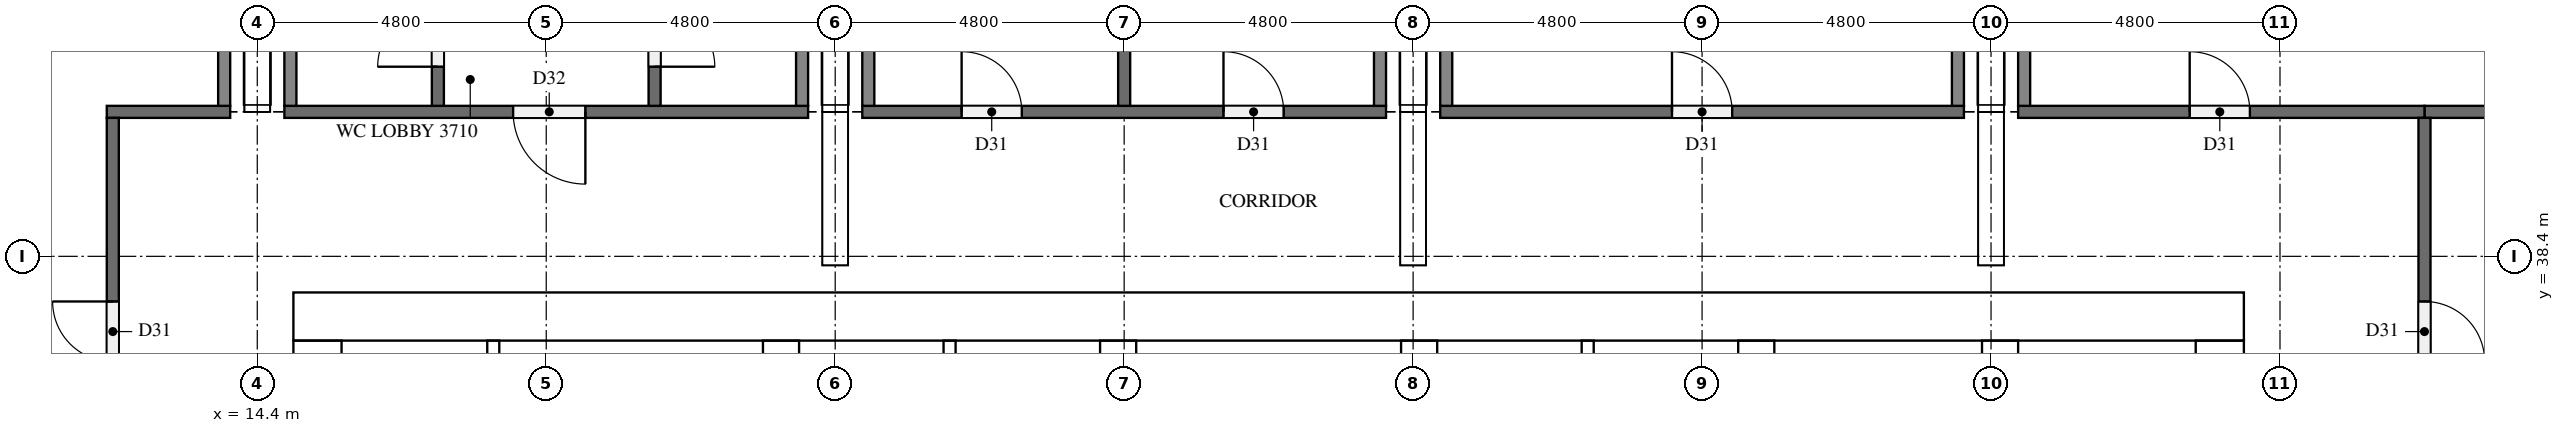
"""IFC4 building model, lengths in metres.
Left out: names, types, materials, properties, quantities, classifications, styles, units other than length and angle.
Written with IfcOpenShell. Run it as: python <this file> out.ifc"""

import sys

from ifc_helpers import new_model, si_unit, direction, frame, frame_2d, origin, place, context, subcontext, project, spatial, rectangle, extrude, element, fill, save


model = new_model("IFC4")
c1 = context("Model", 3, precision=1e-05, world=origin(), true_north=direction((0.0, 1.0)))
c2 = subcontext(c1, "Body", "Model", "MODEL_VIEW")
j1 = project(units=[si_unit("LENGTHUNIT", "METRE"), si_unit("PLANEANGLEUNIT", "RADIAN")], contexts=[c1])
p1 = place(None, origin())
s1 = spatial("IfcSite", under=j1, at=p1, CompositionType="ELEMENT")
p2 = place(p1, origin())
s2 = spatial("IfcBuilding", under=s1, at=p2, CompositionType="ELEMENT")
p3 = place(p2, frame((0.0, 0.0, 143.6)))
s3 = spatial("IfcBuildingStorey", under=s2, at=p3, CompositionType="ELEMENT", Elevation=143.6)
p4 = place(p3, frame((15.0, 37.4, 0.0), z_axis=(0.0, 0.0, 1.0), x_axis=(1.0, 0.0, 0.0)))
e1 = element("IfcWall", 1, at=p4, inside=s3, PredefinedType="SHEAR", context=c2, shape_type="SweptSolid", body=[
    extrude(rectangle(XDim=32.4, YDim=0.8, at=frame_2d((16.2, 0.0))), origin(), (0.0, 0.0, 1.0), 5.1),
])
p5 = place(p4, frame((15.3, 0.0, 0.0)))
e2 = element("IfcOpeningElement", 2, at=p5, cuts=e1, PredefinedType="OPENING", context=c2, shape_type="SweptSolid", body=[
    extrude(rectangle(XDim=1.8, YDim=2.1, at=frame_2d((0.9, 1.05))), frame((0.0, 0.41, 0.0), z_axis=(0.0, -1.0, 0.0), x_axis=(1.0, 0.0, 0.0)), (0.0, 0.0, 1.0), 0.82),
])
p6 = place(p4, frame((1.51, 0.0, 0.0)))
e3 = element("IfcOpeningElement", 3, at=p6, cuts=e1, PredefinedType="OPENING", context=c2, shape_type="SweptSolid", body=[
    extrude(rectangle(XDim=1.0, YDim=2.1, at=frame_2d((0.5, 1.05))), frame((0.0, 0.41, 0.0), z_axis=(0.0, -1.0, 0.0), x_axis=(1.0, 0.0, 0.0)), (0.0, 0.0, 1.0), 0.82),
])
p7 = place(p4, frame((5.11, 0.0, 0.0)))
e4 = element("IfcOpeningElement", 4, at=p7, cuts=e1, PredefinedType="OPENING", context=c2, shape_type="SweptSolid", body=[
    extrude(rectangle(XDim=1.0, YDim=2.1, at=frame_2d((0.5, 1.05))), frame((0.0, 0.41, 0.0), z_axis=(0.0, -1.0, 0.0), x_axis=(1.0, 0.0, 0.0)), (0.0, 0.0, 1.0), 0.82),
])
p8 = place(p3, frame((15.4, 15.8, 0.0), z_axis=(0.0, 0.0, 1.0), x_axis=(0.0, 1.0, 0.0)))
e5 = element("IfcWall", 5, at=p8, inside=s3, PredefinedType="SHEAR", context=c2, shape_type="SweptSolid", body=[
    extrude(rectangle(XDim=21.2, YDim=0.8, at=frame_2d((10.6, 0.0))), origin(), (0.0, 0.0, 1.0), 5.1),
])
p9 = place(p8, frame((4.96, 0.0, 0.0)))
e6 = element("IfcOpeningElement", 6, at=p9, cuts=e5, PredefinedType="OPENING", context=c2, shape_type="SweptSolid", body=[
    extrude(rectangle(XDim=1.2, YDim=2.1, at=frame_2d((0.6, 1.05))), frame((0.0, 0.41, 0.0), z_axis=(0.0, -1.0, 0.0), x_axis=(1.0, 0.0, 0.0)), (0.0, 0.0, 1.0), 0.82),
])
p10 = place(p3, frame((47.0, 15.8, 0.0), z_axis=(0.0, 0.0, 1.0), x_axis=(0.0, 1.0, 0.0)))
e7 = element("IfcWall", 7, at=p10, inside=s3, PredefinedType="SHEAR", context=c2, shape_type="SweptSolid", body=[
    extrude(rectangle(XDim=21.2, YDim=0.8, at=frame_2d((10.6, 0.0))), origin(), (0.0, 0.0, 1.0), 5.1),
])
p11 = place(p10, frame((10.3, 0.0, 0.0)))
e8 = element("IfcOpeningElement", 8, at=p11, cuts=e7, PredefinedType="OPENING", context=c2, shape_type="SweptSolid", body=[
    extrude(rectangle(XDim=1.2, YDim=2.1, at=frame_2d((0.6, 1.05))), frame((0.0, 0.41, 0.0), z_axis=(0.0, -1.0, 0.0), x_axis=(1.0, 0.0, 0.0)), (0.0, 0.0, 1.0), 0.82),
])
p12 = place(p3, frame((23.1, 15.8, 0.0), z_axis=(0.0, 0.0, 1.0), x_axis=(0.0, 1.0, 0.0)))
e9 = element("IfcWall", 9, at=p12, inside=s3, PredefinedType="SHEAR", context=c2, shape_type="SweptSolid", body=[
    extrude(rectangle(XDim=21.2, YDim=0.6, at=frame_2d((10.6, 0.0))), origin(), (0.0, 0.0, 1.0), 5.1),
])
p13 = place(p3, frame((39.3, 27.75, 0.0), z_axis=(0.0, 0.0, 1.0), x_axis=(0.0, 1.0, 0.0)))
e10 = element("IfcWall", 10, at=p13, inside=s3, PredefinedType="SHEAR", context=c2, shape_type="SweptSolid", body=[
    extrude(rectangle(XDim=9.25, YDim=0.6, at=frame_2d((4.625, 0.0))), origin(), (0.0, 0.0, 1.0), 5.1),
])
p14 = place(p3, frame((43.35, 27.75, 0.0), z_axis=(0.0, 0.0, 1.0), x_axis=(0.0, 1.0, 0.0)))
e11 = element("IfcWall", 11, at=p14, inside=s3, PredefinedType="SHEAR", context=c2, shape_type="SweptSolid", body=[
    extrude(rectangle(XDim=9.25, YDim=0.6, at=frame_2d((4.625, 0.0))), origin(), (0.0, 0.0, 1.0), 5.1),
])
p15 = place(p14, frame((7.65, 0.0, 0.0)))
e12 = element("IfcOpeningElement", 12, at=p15, cuts=e11, PredefinedType="OPENING", context=c2, shape_type="SweptSolid", body=[
    extrude(rectangle(XDim=1.2, YDim=2.1, at=frame_2d((0.6, 1.05))), frame((0.0, 0.31, 0.0), z_axis=(0.0, -1.0, 0.0), x_axis=(1.0, 0.0, 0.0)), (0.0, 0.0, 1.0), 0.62),
])
for number, where, z_axis, x_axis in (
    (13, (28.7, 33.85, 0.0), (0.0, 0.0, 1.0), (0.0, 1.0, 0.0)),
    (14, (33.7, 33.85, 0.0), (0.0, 0.0, 1.0), (0.0, 1.0, 0.0)),
):
    element("IfcWall", number, at=place(p3, frame(where, z_axis=z_axis, x_axis=x_axis)), inside=s3, PredefinedType="SHEAR", context=c2, shape_type="SweptSolid", body=[
        extrude(rectangle(XDim=3.15, YDim=0.6, at=frame_2d((1.575, 0.0))), origin(), (0.0, 0.0, 1.0), 5.1),
    ])
for number, where, z_axis, x_axis in (
    (15, (25.9, 33.85, 0.0), (0.0, 0.0, 1.0), (0.0, 1.0, 0.0)),
    (16, (36.5, 33.85, 0.0), (0.0, 0.0, 1.0), (0.0, 1.0, 0.0)),
):
    element("IfcWall", number, at=place(p3, frame(where, z_axis=z_axis, x_axis=x_axis)), inside=s3, PredefinedType="SOLIDWALL", context=c2, shape_type="SweptSolid", body=[
        extrude(rectangle(XDim=3.15, YDim=0.2, at=frame_2d((1.575, 0.0))), origin(), (0.0, 0.0, 1.0), 5.1),
    ])
p16 = place(p3, frame((18.32, 31.55, 0.0), z_axis=(0.0, 0.0, 1.0), x_axis=(0.0, 1.0, 0.0)))
e17 = element("IfcWall", 17, at=p16, inside=s3, PredefinedType="PARTITIONING", context=c2, shape_type="SweptSolid", body=[
    extrude(rectangle(XDim=5.45, YDim=0.2, at=frame_2d((2.725, 0.0))), origin(), (0.0, 0.0, 1.0), 5.1),
])
p17 = place(p3, frame((50.4, 40.8, 0.0), z_axis=(0.0, 0.0, 1.0), x_axis=(1.0, 0.0, 0.0)))
e18 = element("IfcWall", 18, at=p17, inside=s3, PredefinedType="PARTITIONING", context=c2, shape_type="SweptSolid", body=[
    extrude(rectangle(XDim=1.75, YDim=0.2, at=frame_2d((0.875, 0.0))), origin(), (0.0, 0.0, 1.0), 5.1),
])
p18 = place(p3, frame((11.9, 40.8, 0.0), z_axis=(0.0, 0.0, 1.0), x_axis=(1.0, 0.0, 0.0)))
e19 = element("IfcWall", 19, at=p18, inside=s3, PredefinedType="PARTITIONING", context=c2, shape_type="SweptSolid", body=[
    extrude(rectangle(XDim=2.05, YDim=0.2, at=frame_2d((1.025, 0.0))), origin(), (0.0, 0.0, 1.0), 5.1),
])
p19 = place(p3, frame((23.55, 40.8, 0.0), z_axis=(0.0, 0.0, 1.0), x_axis=(-1.0, 0.0, 0.0)))
e20 = element("IfcWall", 20, at=p19, inside=s3, PredefinedType="PARTITIONING", context=c2, shape_type="SweptSolid", body=[
    extrude(rectangle(XDim=8.7, YDim=0.2, at=frame_2d((4.35, 0.0))), origin(), (0.0, 0.0, 1.0), 5.1),
])
p20 = place(p19, frame((3.7, 0.0, 0.0)))
e21 = element("IfcOpeningElement", 21, at=p20, cuts=e20, PredefinedType="OPENING", context=c2, shape_type="SweptSolid", body=[
    extrude(rectangle(XDim=1.2, YDim=2.1, at=frame_2d((0.6, 1.05))), frame((0.0, 0.11, 0.0), z_axis=(0.0, -1.0, 0.0), x_axis=(1.0, 0.0, 0.0)), (0.0, 0.0, 1.0), 0.22),
])
p21 = place(p3, frame((24.45, 40.8, 0.0), z_axis=(0.0, 0.0, 1.0), x_axis=(1.0, 0.0, 0.0)))
e22 = element("IfcWall", 22, at=p21, inside=s3, PredefinedType="PARTITIONING", context=c2, shape_type="SweptSolid", body=[
    extrude(rectangle(XDim=8.7, YDim=0.2, at=frame_2d((4.35, 0.0))), origin(), (0.0, 0.0, 1.0), 5.1),
])
p22 = place(p21, frame((1.65, 0.0, 0.0)))
e23 = element("IfcOpeningElement", 23, at=p22, cuts=e22, PredefinedType="OPENING", context=c2, shape_type="SweptSolid", body=[
    extrude(rectangle(XDim=1.0, YDim=2.1, at=frame_2d((0.5, 1.05))), frame((0.0, 0.11, 0.0), z_axis=(0.0, -1.0, 0.0), x_axis=(1.0, 0.0, 0.0)), (0.0, 0.0, 1.0), 0.22),
])
p23 = place(p21, frame((6.0, 0.0, 0.0)))
e24 = element("IfcOpeningElement", 24, at=p23, cuts=e22, PredefinedType="OPENING", context=c2, shape_type="SweptSolid", body=[
    extrude(rectangle(XDim=1.0, YDim=2.1, at=frame_2d((0.5, 1.05))), frame((0.0, 0.11, 0.0), z_axis=(0.0, -1.0, 0.0), x_axis=(1.0, 0.0, 0.0)), (0.0, 0.0, 1.0), 0.22),
])
p24 = place(p3, frame((34.05, 40.8, 0.0), z_axis=(0.0, 0.0, 1.0), x_axis=(1.0, 0.0, 0.0)))
e25 = element("IfcWall", 25, at=p24, inside=s3, PredefinedType="PARTITIONING", context=c2, shape_type="SweptSolid", body=[
    extrude(rectangle(XDim=8.7, YDim=0.2, at=frame_2d((4.35, 0.0))), origin(), (0.0, 0.0, 1.0), 5.1),
])
p25 = place(p24, frame((3.85, 0.0, 0.0)))
e26 = element("IfcOpeningElement", 26, at=p25, cuts=e25, PredefinedType="OPENING", context=c2, shape_type="SweptSolid", body=[
    extrude(rectangle(XDim=1.0, YDim=2.1, at=frame_2d((0.5, 1.05))), frame((0.0, 0.11, 0.0), z_axis=(0.0, -1.0, 0.0), x_axis=(1.0, 0.0, 0.0)), (0.0, 0.0, 1.0), 0.22),
])
p26 = place(p3, frame((43.65, 40.8, 0.0), z_axis=(0.0, 0.0, 1.0), x_axis=(1.0, 0.0, 0.0)))
e27 = element("IfcWall", 27, at=p26, inside=s3, PredefinedType="PARTITIONING", context=c2, shape_type="SweptSolid", body=[
    extrude(rectangle(XDim=6.75, YDim=0.2, at=frame_2d((3.375, 0.0))), origin(), (0.0, 0.0, 1.0), 5.1),
])
p27 = place(p26, frame((2.85, 0.0, 0.0)))
e28 = element("IfcOpeningElement", 28, at=p27, cuts=e27, PredefinedType="OPENING", context=c2, shape_type="SweptSolid", body=[
    extrude(rectangle(XDim=1.0, YDim=2.1, at=frame_2d((0.5, 1.05))), frame((0.0, 0.11, 0.0), z_axis=(0.0, -1.0, 0.0), x_axis=(1.0, 0.0, 0.0)), (0.0, 0.0, 1.0), 0.22),
])
p28 = place(p3, frame((12.0, 12.1, 0.0), z_axis=(0.0, 0.0, 1.0), x_axis=(0.0, 1.0, 0.0)))
e29 = element("IfcWall", 29, at=p28, inside=s3, PredefinedType="PARTITIONING", context=c2, shape_type="SweptSolid", body=[
    extrude(rectangle(XDim=28.6, YDim=0.2, at=frame_2d((14.3, 0.0))), origin(), (0.0, 0.0, 1.0), 5.1),
])
p29 = place(p28, frame((5.45, 0.0, 0.0)))
e30 = element("IfcOpeningElement", 30, at=p29, cuts=e29, PredefinedType="OPENING", context=c2, shape_type="SweptSolid", body=[
    extrude(rectangle(XDim=1.0, YDim=2.1, at=frame_2d((0.5, 1.05))), frame((0.0, 0.11, 0.0), z_axis=(0.0, -1.0, 0.0), x_axis=(1.0, 0.0, 0.0)), (0.0, 0.0, 1.0), 0.22),
])
p30 = place(p28, frame((13.85, 0.0, 0.0)))
e31 = element("IfcOpeningElement", 31, at=p30, cuts=e29, PredefinedType="OPENING", context=c2, shape_type="SweptSolid", body=[
    extrude(rectangle(XDim=1.0, YDim=2.1, at=frame_2d((0.5, 1.05))), frame((0.0, 0.11, 0.0), z_axis=(0.0, -1.0, 0.0), x_axis=(1.0, 0.0, 0.0)), (0.0, 0.0, 1.0), 0.22),
])
p31 = place(p28, frame((18.65, 0.0, 0.0)))
e32 = element("IfcOpeningElement", 32, at=p31, cuts=e29, PredefinedType="OPENING", context=c2, shape_type="SweptSolid", body=[
    extrude(rectangle(XDim=1.0, YDim=2.1, at=frame_2d((0.5, 1.05))), frame((0.0, 0.11, 0.0), z_axis=(0.0, -1.0, 0.0), x_axis=(1.0, 0.0, 0.0)), (0.0, 0.0, 1.0), 0.22),
])
p32 = place(p28, frame((24.55, 0.0, 0.0)))
e33 = element("IfcOpeningElement", 33, at=p32, cuts=e29, PredefinedType="OPENING", context=c2, shape_type="SweptSolid", body=[
    extrude(rectangle(XDim=1.0, YDim=2.1, at=frame_2d((0.5, 1.05))), frame((0.0, 0.11, 0.0), z_axis=(0.0, -1.0, 0.0), x_axis=(1.0, 0.0, 0.0)), (0.0, 0.0, 1.0), 0.22),
])
for number, where, z_axis, x_axis in (
    (34, (13.85, 40.9, 0.0), (0.0, 0.0, 1.0), (0.0, 1.0, 0.0)),
    (35, (14.95, 40.9, 0.0), (0.0, 0.0, 1.0), (0.0, 1.0, 0.0)),
):
    element("IfcWall", number, at=place(p3, frame(where, z_axis=z_axis, x_axis=x_axis)), inside=s3, PredefinedType="PARTITIONING", context=c2, shape_type="SweptSolid", body=[
        extrude(rectangle(XDim=4.8, YDim=0.2, at=frame_2d((2.4, 0.0))), origin(), (0.0, 0.0, 1.0), 5.1),
    ])
p33 = place(p3, frame((17.4, 40.9, 0.0), z_axis=(0.0, 0.0, 1.0), x_axis=(0.0, 1.0, 0.0)))
e36 = element("IfcWall", 36, at=p33, inside=s3, PredefinedType="PARTITIONING", context=c2, shape_type="SweptSolid", body=[
    extrude(rectangle(XDim=4.8, YDim=0.2, at=frame_2d((2.4, 0.0))), origin(), (0.0, 0.0, 1.0), 5.1),
])
p34 = place(p33, frame((0.65, 0.0, 0.0)))
e37 = element("IfcOpeningElement", 37, at=p34, cuts=e36, PredefinedType="OPENING", context=c2, shape_type="SweptSolid", body=[
    extrude(rectangle(XDim=1.0, YDim=2.1, at=frame_2d((0.5, 1.05))), frame((0.0, 0.11, 0.0), z_axis=(0.0, -1.0, 0.0), x_axis=(1.0, 0.0, 0.0)), (0.0, 0.0, 1.0), 0.22),
])
p35 = place(p3, frame((21.0, 45.7, 0.0), z_axis=(0.0, 0.0, 1.0), x_axis=(0.0, -1.0, 0.0)))
e38 = element("IfcWall", 38, at=p35, inside=s3, PredefinedType="PARTITIONING", context=c2, shape_type="SweptSolid", body=[
    extrude(rectangle(XDim=4.8, YDim=0.2, at=frame_2d((2.4, 0.0))), origin(), (0.0, 0.0, 1.0), 5.1),
])
p36 = place(p35, frame((3.15, 0.0, 0.0)))
e39 = element("IfcOpeningElement", 39, at=p36, cuts=e38, PredefinedType="OPENING", context=c2, shape_type="SweptSolid", body=[
    extrude(rectangle(XDim=1.0, YDim=2.1, at=frame_2d((0.5, 1.05))), frame((0.0, 0.11, 0.0), z_axis=(0.0, -1.0, 0.0), x_axis=(1.0, 0.0, 0.0)), (0.0, 0.0, 1.0), 0.22),
])
for number, where, z_axis, x_axis in (
    (40, (23.45, 40.9, 0.0), (0.0, 0.0, 1.0), (0.0, 1.0, 0.0)),
    (41, (24.55, 40.9, 0.0), (0.0, 0.0, 1.0), (0.0, 1.0, 0.0)),
    (42, (28.8, 40.9, 0.0), (0.0, 0.0, 1.0), (0.0, 1.0, 0.0)),
    (43, (33.05, 40.9, 0.0), (0.0, 0.0, 1.0), (0.0, 1.0, 0.0)),
    (44, (34.15, 40.9, 0.0), (0.0, 0.0, 1.0), (0.0, 1.0, 0.0)),
    (45, (42.65, 40.9, 0.0), (0.0, 0.0, 1.0), (0.0, 1.0, 0.0)),
    (46, (43.75, 40.9, 0.0), (0.0, 0.0, 1.0), (0.0, 1.0, 0.0)),
):
    element("IfcWall", number, at=place(p3, frame(where, z_axis=z_axis, x_axis=x_axis)), inside=s3, PredefinedType="PARTITIONING", context=c2, shape_type="SweptSolid", body=[
        extrude(rectangle(XDim=4.8, YDim=0.2, at=frame_2d((2.4, 0.0))), origin(), (0.0, 0.0, 1.0), 5.1),
    ])
p37 = place(p3, frame((50.4, 40.7, 0.0), z_axis=(0.0, 0.0, 1.0), x_axis=(0.0, -1.0, 0.0)))
e47 = element("IfcWall", 47, at=p37, inside=s3, PredefinedType="PARTITIONING", context=c2, shape_type="SweptSolid", body=[
    extrude(rectangle(XDim=28.6, YDim=0.2, at=frame_2d((14.3, 0.0))), origin(), (0.0, 0.0, 1.0), 5.1),
])
p38 = place(p37, frame((24.55, 0.0, 0.0)))
e48 = element("IfcOpeningElement", 48, at=p38, cuts=e47, PredefinedType="OPENING", context=c2, shape_type="SweptSolid", body=[
    extrude(rectangle(XDim=1.0, YDim=2.1, at=frame_2d((0.5, 1.05))), frame((0.0, 0.11, 0.0), z_axis=(0.0, -1.0, 0.0), x_axis=(1.0, 0.0, 0.0)), (0.0, 0.0, 1.0), 0.22),
])
p39 = place(p37, frame((18.65, 0.0, 0.0)))
e49 = element("IfcOpeningElement", 49, at=p39, cuts=e47, PredefinedType="OPENING", context=c2, shape_type="SweptSolid", body=[
    extrude(rectangle(XDim=1.0, YDim=2.1, at=frame_2d((0.5, 1.05))), frame((0.0, 0.11, 0.0), z_axis=(0.0, -1.0, 0.0), x_axis=(1.0, 0.0, 0.0)), (0.0, 0.0, 1.0), 0.22),
])
p40 = place(p37, frame((13.85, 0.0, 0.0)))
e50 = element("IfcOpeningElement", 50, at=p40, cuts=e47, PredefinedType="OPENING", context=c2, shape_type="SweptSolid", body=[
    extrude(rectangle(XDim=1.0, YDim=2.1, at=frame_2d((0.5, 1.05))), frame((0.0, 0.11, 0.0), z_axis=(0.0, -1.0, 0.0), x_axis=(1.0, 0.0, 0.0)), (0.0, 0.0, 1.0), 0.22),
])
p41 = place(p37, frame((9.05, 0.0, 0.0)))
e51 = element("IfcOpeningElement", 51, at=p41, cuts=e47, PredefinedType="OPENING", context=c2, shape_type="SweptSolid", body=[
    extrude(rectangle(XDim=1.0, YDim=2.1, at=frame_2d((0.5, 1.05))), frame((0.0, 0.11, 0.0), z_axis=(0.0, -1.0, 0.0), x_axis=(1.0, 0.0, 0.0)), (0.0, 0.0, 1.0), 0.22),
])
p42 = place(p37, frame((3.05, 0.0, 0.0)))
e52 = element("IfcOpeningElement", 52, at=p42, cuts=e47, PredefinedType="OPENING", context=c2, shape_type="SweptSolid", body=[
    extrude(rectangle(XDim=1.0, YDim=2.1, at=frame_2d((0.5, 1.05))), frame((0.0, 0.11, 0.0), z_axis=(0.0, -1.0, 0.0), x_axis=(1.0, 0.0, 0.0)), (0.0, 0.0, 1.0), 0.22),
])
p43 = place(p5, origin())
e53 = element("IfcDoor", 53, at=p43, inside=s3, OperationType="DOUBLE_DOOR_SINGLE_SWING", PredefinedType="DOOR", context=c2, shape_type="SweptSolid", body=[
    extrude(rectangle(XDim=1.8, YDim=2.1, at=frame_2d((0.9, 1.05))), frame((0.0, 0.025, 0.0), z_axis=(0.0, -1.0, 0.0), x_axis=(1.0, 0.0, 0.0)), (0.0, 0.0, 1.0), 0.05),
])
fill(e2, e53)
p44 = place(p6, origin())
e54 = element("IfcDoor", 54, at=p44, inside=s3, OperationType="SINGLE_SWING_RIGHT", PredefinedType="DOOR", context=c2, shape_type="SweptSolid", body=[
    extrude(rectangle(XDim=1.0, YDim=2.1, at=frame_2d((0.5, 1.05))), frame((0.0, 0.025, 0.0), z_axis=(0.0, -1.0, 0.0), x_axis=(1.0, 0.0, 0.0)), (0.0, 0.0, 1.0), 0.05),
])
fill(e3, e54)
p45 = place(p7, origin())
e55 = element("IfcDoor", 55, at=p45, inside=s3, OperationType="SINGLE_SWING_LEFT", PredefinedType="DOOR", context=c2, shape_type="SweptSolid", body=[
    extrude(rectangle(XDim=1.0, YDim=2.1, at=frame_2d((0.5, 1.05))), frame((0.0, 0.025, 0.0), z_axis=(0.0, -1.0, 0.0), x_axis=(1.0, 0.0, 0.0)), (0.0, 0.0, 1.0), 0.05),
])
fill(e4, e55)
p46 = place(p32, origin())
e56 = element("IfcDoor", 56, at=p46, inside=s3, OperationType="SINGLE_SWING_RIGHT", PredefinedType="DOOR", context=c2, shape_type="SweptSolid", body=[
    extrude(rectangle(XDim=1.0, YDim=2.1, at=frame_2d((0.5, 1.05))), frame((0.0, 0.025, 0.0), z_axis=(0.0, -1.0, 0.0), x_axis=(1.0, 0.0, 0.0)), (0.0, 0.0, 1.0), 0.05),
])
fill(e33, e56)
p47 = place(p20, origin())
e57 = element("IfcDoor", 57, at=p47, inside=s3, OperationType="SINGLE_SWING_LEFT", PredefinedType="DOOR", context=c2, shape_type="SweptSolid", body=[
    extrude(rectangle(XDim=1.2, YDim=2.1, at=frame_2d((0.6, 1.05))), frame((0.0, 0.025, 0.0), z_axis=(0.0, -1.0, 0.0), x_axis=(1.0, 0.0, 0.0)), (0.0, 0.0, 1.0), 0.05),
])
fill(e21, e57)
p48 = place(p34, origin())
e58 = element("IfcDoor", 58, at=p48, inside=s3, OperationType="SINGLE_SWING_LEFT", PredefinedType="DOOR", context=c2, shape_type="SweptSolid", body=[
    extrude(rectangle(XDim=1.0, YDim=2.1, at=frame_2d((0.5, 1.05))), frame((0.0, 0.025, 0.0), z_axis=(0.0, -1.0, 0.0), x_axis=(1.0, 0.0, 0.0)), (0.0, 0.0, 1.0), 0.05),
])
fill(e37, e58)
p49 = place(p36, origin())
e59 = element("IfcDoor", 59, at=p49, inside=s3, OperationType="SINGLE_SWING_RIGHT", PredefinedType="DOOR", context=c2, shape_type="SweptSolid", body=[
    extrude(rectangle(XDim=1.0, YDim=2.1, at=frame_2d((0.5, 1.05))), frame((0.0, 0.025, 0.0), z_axis=(0.0, -1.0, 0.0), x_axis=(1.0, 0.0, 0.0)), (0.0, 0.0, 1.0), 0.05),
])
fill(e39, e59)
p50 = place(p22, origin())
e60 = element("IfcDoor", 60, at=p50, inside=s3, OperationType="SINGLE_SWING_LEFT", PredefinedType="DOOR", context=c2, shape_type="SweptSolid", body=[
    extrude(rectangle(XDim=1.0, YDim=2.1, at=frame_2d((0.5, 1.05))), frame((0.0, 0.025, 0.0), z_axis=(0.0, -1.0, 0.0), x_axis=(1.0, 0.0, 0.0)), (0.0, 0.0, 1.0), 0.05),
])
fill(e23, e60)
p51 = place(p23, origin())
e61 = element("IfcDoor", 61, at=p51, inside=s3, OperationType="SINGLE_SWING_LEFT", PredefinedType="DOOR", context=c2, shape_type="SweptSolid", body=[
    extrude(rectangle(XDim=1.0, YDim=2.1, at=frame_2d((0.5, 1.05))), frame((0.0, 0.025, 0.0), z_axis=(0.0, -1.0, 0.0), x_axis=(1.0, 0.0, 0.0)), (0.0, 0.0, 1.0), 0.05),
])
fill(e24, e61)
p52 = place(p25, origin())
e62 = element("IfcDoor", 62, at=p52, inside=s3, OperationType="SINGLE_SWING_LEFT", PredefinedType="DOOR", context=c2, shape_type="SweptSolid", body=[
    extrude(rectangle(XDim=1.0, YDim=2.1, at=frame_2d((0.5, 1.05))), frame((0.0, 0.025, 0.0), z_axis=(0.0, -1.0, 0.0), x_axis=(1.0, 0.0, 0.0)), (0.0, 0.0, 1.0), 0.05),
])
fill(e26, e62)
p53 = place(p27, origin())
e63 = element("IfcDoor", 63, at=p53, inside=s3, OperationType="SINGLE_SWING_LEFT", PredefinedType="DOOR", context=c2, shape_type="SweptSolid", body=[
    extrude(rectangle(XDim=1.0, YDim=2.1, at=frame_2d((0.5, 1.05))), frame((0.0, 0.025, 0.0), z_axis=(0.0, -1.0, 0.0), x_axis=(1.0, 0.0, 0.0)), (0.0, 0.0, 1.0), 0.05),
])
fill(e28, e63)
p54 = place(p42, origin())
e64 = element("IfcDoor", 64, at=p54, inside=s3, OperationType="SINGLE_SWING_RIGHT", PredefinedType="DOOR", context=c2, shape_type="SweptSolid", body=[
    extrude(rectangle(XDim=1.0, YDim=2.1, at=frame_2d((0.5, 1.05))), frame((0.0, 0.025, 0.0), z_axis=(0.0, -1.0, 0.0), x_axis=(1.0, 0.0, 0.0)), (0.0, 0.0, 1.0), 0.05),
])
fill(e52, e64)
save(model, sys.argv[1])
